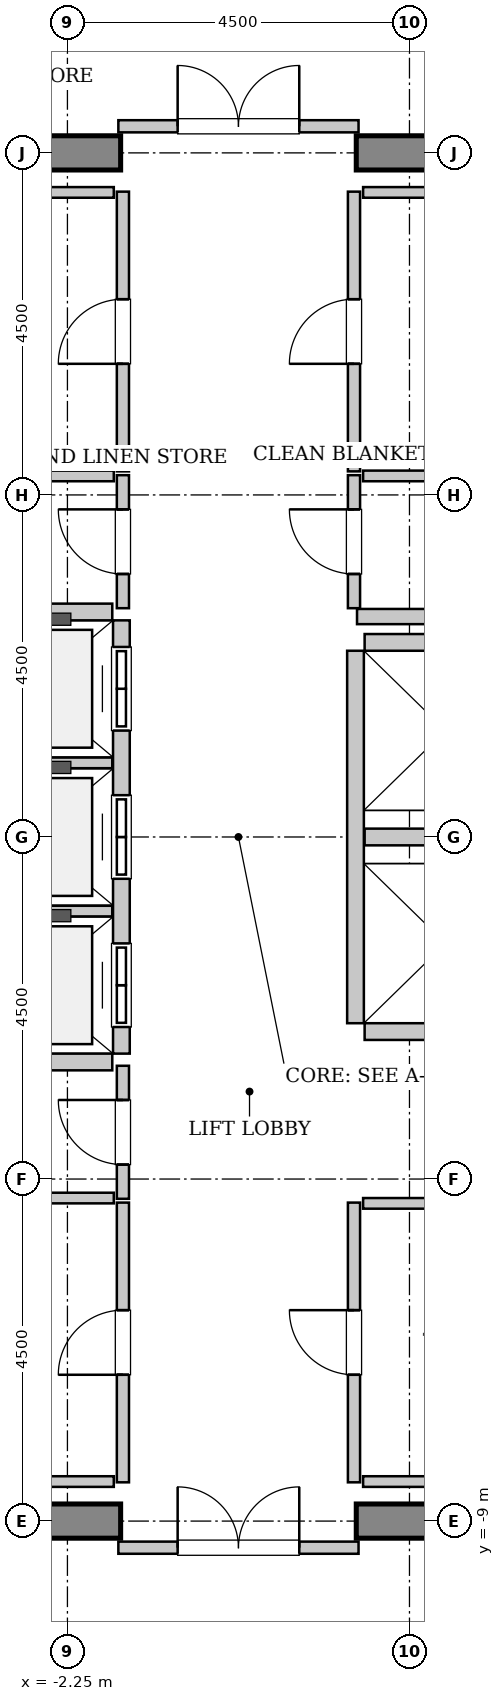
"""IFC4 building model, lengths in metres.
Left out: names, types, materials, properties, quantities, classifications, styles, units other than length and angle.
Written with IfcOpenShell. Run it as: python <this file> out.ifc"""

import sys

from ifc_helpers import new_model, si_unit, direction, frame, frame_2d, origin, place, context, subcontext, project, spatial, rectangle, extrude, source, transform, mapped, element, fill, save


model = new_model("IFC4")
c1 = context("Model", 3, precision=1e-05, world=origin(), true_north=direction((0.0, 1.0)))
c2 = subcontext(c1, "Body", "Model", "MODEL_VIEW")
j1 = project(units=[si_unit("LENGTHUNIT", "METRE"), si_unit("PLANEANGLEUNIT", "RADIAN")], contexts=[c1])
p1 = place(None, origin())
s1 = spatial("IfcSite", under=j1, at=p1, CompositionType="ELEMENT")
p2 = place(p1, origin())
s2 = spatial("IfcBuilding", under=s1, at=p2, CompositionType="ELEMENT")
p3 = place(p2, frame((0.0, 0.0, 314.0)))
s3 = spatial("IfcBuildingStorey", under=s2, at=p3, CompositionType="ELEMENT", Elevation=314.0)
m1 = source(origin(), c2, "Body", "SweptSolid", [
    extrude(rectangle(XDim=9.925, YDim=0.45, at=frame_2d((4.962, 0.0))), origin(), (0.0, 0.0, 1.0), 3.8),
])
for number, where, z_axis, x_axis in (
    (1, (-11.475, 9.0, 0.0), (0.0, 0.0, 1.0), (1.0, 0.0, 0.0)),
    (2, (1.55, 9.0, 0.0), (0.0, 0.0, 1.0), (1.0, 0.0, 0.0)),
    (3, (-11.475, -9.0, 0.0), (0.0, 0.0, 1.0), (1.0, 0.0, 0.0)),
    (4, (1.55, -9.0, 0.0), (0.0, 0.0, 1.0), (1.0, 0.0, 0.0)),
):
    element("IfcWall", number, at=place(p3, frame(where, z_axis=z_axis, x_axis=x_axis)), inside=s3, PredefinedType="SHEAR", context=c2, shape_type="MappedRepresentation", body=[
        mapped(m1, transform((0.0, 0.0, 0.0), x_axis=(1.0, 0.0, 0.0), y_axis=(0.0, 1.0, 0.0), z_axis=(0.0, 0.0, 1.0), scale=1.0)),
    ])
m2 = source(origin(), c2, "Body", "SweptSolid", [
    extrude(rectangle(XDim=5.7, YDim=0.22, at=frame_2d((2.85, 0.0))), origin(), (0.0, 0.0, 1.0), 3.485),
])
p4 = place(p3, frame((-1.54, -2.85, 0.0), z_axis=(0.0, 0.0, 1.0), x_axis=(0.0, 1.0, 0.0)))
e5 = element("IfcWall", 5, at=p4, inside=s3, PredefinedType="SOLIDWALL", context=c2, shape_type="MappedRepresentation", body=[
    mapped(m2, transform((0.0, 0.0, 0.0), x_axis=(1.0, 0.0, 0.0), y_axis=(0.0, 1.0, 0.0), z_axis=(0.0, 0.0, 1.0), scale=1.0)),
])
p5 = place(p4, frame((0.35, 0.0, 0.0)))
e6 = element("IfcOpeningElement", 6, at=p5, cuts=e5, PredefinedType="OPENING", context=c2, shape_type="SweptSolid", body=[
    extrude(rectangle(XDim=1.1, YDim=2.2, at=frame_2d((0.55, 1.1))), frame((0.0, 0.12, 0.0), z_axis=(0.0, -1.0, 0.0), x_axis=(1.0, 0.0, 0.0)), (0.0, 0.0, 1.0), 0.24),
])
p6 = place(p4, frame((2.3, 0.0, 0.0)))
e7 = element("IfcOpeningElement", 7, at=p6, cuts=e5, PredefinedType="OPENING", context=c2, shape_type="SweptSolid", body=[
    extrude(rectangle(XDim=1.1, YDim=2.2, at=frame_2d((0.55, 1.1))), frame((0.0, 0.12, 0.0), z_axis=(0.0, -1.0, 0.0), x_axis=(1.0, 0.0, 0.0)), (0.0, 0.0, 1.0), 0.24),
])
p7 = place(p4, frame((4.25, 0.0, 0.0)))
e8 = element("IfcOpeningElement", 8, at=p7, cuts=e5, PredefinedType="OPENING", context=c2, shape_type="SweptSolid", body=[
    extrude(rectangle(XDim=1.1, YDim=2.2, at=frame_2d((0.55, 1.1))), frame((0.0, 0.12, 0.0), z_axis=(0.0, -1.0, 0.0), x_axis=(1.0, 0.0, 0.0)), (0.0, 0.0, 1.0), 0.24),
])
m3 = source(origin(), c2, "Body", "SweptSolid", [
    extrude(rectangle(XDim=2.13, YDim=0.22, at=frame_2d((1.065, 0.0))), origin(), (0.0, 0.0, 1.0), 3.485),
])
p8 = place(p3, frame((-3.79, -2.96, 0.0), z_axis=(0.0, 0.0, 1.0), x_axis=(1.0, 0.0, 0.0)))
e9 = element("IfcWall", 9, at=p8, inside=s3, PredefinedType="SOLIDWALL", context=c2, shape_type="MappedRepresentation", body=[
    mapped(m3, transform((0.0, 0.0, 0.0), x_axis=(1.0, 0.0, 0.0), y_axis=(0.0, 1.0, 0.0), z_axis=(0.0, 0.0, 1.0), scale=1.0)),
])
m4 = source(origin(), c2, "Body", "SweptSolid", [
    extrude(rectangle(XDim=2.13, YDim=0.14, at=frame_2d((1.065, 0.0))), origin(), (0.0, 0.0, 1.0), 3.485),
])
for number, where, z_axis, x_axis in (
    (10, (-3.79, -0.975, 0.0), (0.0, 0.0, 1.0), (1.0, 0.0, 0.0)),
    (11, (-3.79, 0.975, 0.0), (0.0, 0.0, 1.0), (1.0, 0.0, 0.0)),
):
    element("IfcWall", number, at=place(p3, frame(where, z_axis=z_axis, x_axis=x_axis)), inside=s3, PredefinedType="PARTITIONING", context=c2, shape_type="MappedRepresentation", body=[
        mapped(m4, transform((0.0, 0.0, 0.0), x_axis=(1.0, 0.0, 0.0), y_axis=(0.0, 1.0, 0.0), z_axis=(0.0, 0.0, 1.0), scale=1.0)),
    ])
p9 = place(p3, frame((-1.66, 2.96, 0.0), z_axis=(0.0, 0.0, 1.0), x_axis=(-1.0, 0.0, 0.0)))
e12 = element("IfcWall", 12, at=p9, inside=s3, PredefinedType="SOLIDWALL", context=c2, shape_type="MappedRepresentation", body=[
    mapped(m3, transform((0.0, 0.0, 0.0), x_axis=(1.0, 0.0, 0.0), y_axis=(0.0, 1.0, 0.0), z_axis=(0.0, 0.0, 1.0), scale=1.0)),
])
m5 = source(origin(), c2, "Body", "SweptSolid", [
    extrude(rectangle(XDim=4.9, YDim=0.22, at=frame_2d((2.45, 0.0))), origin(), (0.0, 0.0, 1.0), 3.485),
])
p10 = place(p3, frame((1.54, 2.45, 0.0), z_axis=(0.0, 0.0, 1.0), x_axis=(0.0, -1.0, 0.0)))
e13 = element("IfcWall", 13, at=p10, inside=s3, PredefinedType="SOLIDWALL", context=c2, shape_type="MappedRepresentation", body=[
    mapped(m5, transform((0.0, 0.0, 0.0), x_axis=(1.0, 0.0, 0.0), y_axis=(0.0, 1.0, 0.0), z_axis=(0.0, 0.0, 1.0), scale=1.0)),
])
for number, where, z_axis, x_axis in (
    (14, (1.66, -2.56, 0.0), (0.0, 0.0, 1.0), (1.0, 0.0, 0.0)),
    (15, (1.66, 0.0, 0.0), (0.0, 0.0, 1.0), (1.0, 0.0, 0.0)),
    (16, (3.79, 2.56, 0.0), (0.0, 0.0, 1.0), (-1.0, 0.0, 0.0)),
):
    element("IfcWall", number, at=place(p3, frame(where, z_axis=z_axis, x_axis=x_axis)), inside=s3, PredefinedType="SOLIDWALL", context=c2, shape_type="MappedRepresentation", body=[
        mapped(m3, transform((0.0, 0.0, 0.0), x_axis=(1.0, 0.0, 0.0), y_axis=(0.0, 1.0, 0.0), z_axis=(0.0, 0.0, 1.0), scale=1.0)),
    ])
m6 = source(origin(), c2, "Body", "SweptSolid", [
    extrude(rectangle(XDim=2.52, YDim=0.2, at=frame_2d((1.26, 0.0))), origin(), (0.0, 0.0, 1.0), 3.485),
])
p11 = place(p3, frame((1.56, 2.9, 0.0), z_axis=(0.0, 0.0, 1.0), x_axis=(1.0, 0.0, 0.0)))
e17 = element("IfcWall", 17, at=p11, inside=s3, PredefinedType="PARTITIONING", context=c2, shape_type="MappedRepresentation", body=[
    mapped(m6, transform((0.0, 0.0, 0.0), x_axis=(1.0, 0.0, 0.0), y_axis=(0.0, 1.0, 0.0), z_axis=(0.0, 0.0, 1.0), scale=1.0)),
])
m7 = source(origin(), c2, "Body", "SweptSolid", [
    extrude(rectangle(XDim=3.16, YDim=0.16, at=frame_2d((1.58, 0.0))), origin(), (0.0, 0.0, 1.0), 2.575),
])
p12 = place(p3, frame((-1.58, 9.35, 0.0), z_axis=(0.0, 0.0, 1.0), x_axis=(1.0, 0.0, 0.0)))
e18 = element("IfcWall", 18, at=p12, inside=s3, PredefinedType="PARTITIONING", context=c2, shape_type="MappedRepresentation", body=[
    mapped(m7, transform((0.0, 0.0, 0.0), x_axis=(1.0, 0.0, 0.0), y_axis=(0.0, 1.0, 0.0), z_axis=(0.0, 0.0, 1.0), scale=1.0)),
])
p13 = place(p12, frame((0.78, 0.0, 0.0)))
e19 = element("IfcOpeningElement", 19, at=p13, cuts=e18, PredefinedType="OPENING", context=c2, shape_type="SweptSolid", body=[
    extrude(rectangle(XDim=1.6, YDim=2.3, at=frame_2d((0.8, 1.15))), frame((0.0, 0.09, 0.0), z_axis=(0.0, -1.0, 0.0), x_axis=(1.0, 0.0, 0.0)), (0.0, 0.0, 1.0), 0.18),
])
p14 = place(p3, frame((-1.58, -9.35, 0.0), z_axis=(0.0, 0.0, 1.0), x_axis=(1.0, 0.0, 0.0)))
e20 = element("IfcWall", 20, at=p14, inside=s3, PredefinedType="PARTITIONING", context=c2, shape_type="MappedRepresentation", body=[
    mapped(m7, transform((0.0, 0.0, 0.0), x_axis=(1.0, 0.0, 0.0), y_axis=(0.0, 1.0, 0.0), z_axis=(0.0, 0.0, 1.0), scale=1.0)),
])
p15 = place(p14, frame((0.78, 0.0, 0.0)))
e21 = element("IfcOpeningElement", 21, at=p15, cuts=e20, PredefinedType="OPENING", context=c2, shape_type="SweptSolid", body=[
    extrude(rectangle(XDim=1.6, YDim=2.3, at=frame_2d((0.8, 1.15))), frame((0.0, 0.09, 0.0), z_axis=(0.0, -1.0, 0.0), x_axis=(1.0, 0.0, 0.0)), (0.0, 0.0, 1.0), 0.18),
])
m8 = source(origin(), c2, "Body", "SweptSolid", [
    extrude(rectangle(XDim=1.75, YDim=0.16, at=frame_2d((0.875, 0.0))), origin(), (0.0, 0.0, 1.0), 3.485),
])
p16 = place(p3, frame((-1.52, 3.01, 0.0), z_axis=(0.0, 0.0, 1.0), x_axis=(0.0, 1.0, 0.0)))
e22 = element("IfcWall", 22, at=p16, inside=s3, PredefinedType="PARTITIONING", context=c2, shape_type="MappedRepresentation", body=[
    mapped(m8, transform((0.0, 0.0, 0.0), x_axis=(1.0, 0.0, 0.0), y_axis=(0.0, 1.0, 0.0), z_axis=(0.0, 0.0, 1.0), scale=1.0)),
])
p17 = place(p16, frame((0.45, 0.0, 0.0)))
e23 = element("IfcOpeningElement", 23, at=p17, cuts=e22, PredefinedType="OPENING", context=c2, shape_type="SweptSolid", body=[
    extrude(rectangle(XDim=0.85, YDim=2.1, at=frame_2d((0.425, 1.05))), frame((0.0, 0.09, 0.0), z_axis=(0.0, -1.0, 0.0), x_axis=(1.0, 0.0, 0.0)), (0.0, 0.0, 1.0), 0.18),
])
m9 = source(origin(), c2, "Body", "SweptSolid", [
    extrude(rectangle(XDim=2.95, YDim=0.14, at=frame_2d((1.475, 0.0))), origin(), (0.0, 0.0, 1.0), 3.485),
])
p18 = place(p3, frame((-4.59, 4.75, 0.0), z_axis=(0.0, 0.0, 1.0), x_axis=(1.0, 0.0, 0.0)))
e24 = element("IfcWall", 24, at=p18, inside=s3, PredefinedType="PARTITIONING", context=c2, shape_type="MappedRepresentation", body=[
    mapped(m9, transform((0.0, 0.0, 0.0), x_axis=(1.0, 0.0, 0.0), y_axis=(0.0, 1.0, 0.0), z_axis=(0.0, 0.0, 1.0), scale=1.0)),
])
m10 = source(origin(), c2, "Body", "SweptSolid", [
    extrude(rectangle(XDim=3.68, YDim=0.16, at=frame_2d((1.84, 0.0))), origin(), (0.0, 0.0, 1.0), 3.485),
])
p19 = place(p3, frame((-1.52, 4.81, 0.0), z_axis=(0.0, 0.0, 1.0), x_axis=(0.0, 1.0, 0.0)))
e25 = element("IfcWall", 25, at=p19, inside=s3, PredefinedType="PARTITIONING", context=c2, shape_type="MappedRepresentation", body=[
    mapped(m10, transform((0.0, 0.0, 0.0), x_axis=(1.0, 0.0, 0.0), y_axis=(0.0, 1.0, 0.0), z_axis=(0.0, 0.0, 1.0), scale=1.0)),
])
p20 = place(p19, frame((1.415, 0.0, 0.0)))
e26 = element("IfcOpeningElement", 26, at=p20, cuts=e25, PredefinedType="OPENING", context=c2, shape_type="SweptSolid", body=[
    extrude(rectangle(XDim=0.85, YDim=2.1, at=frame_2d((0.425, 1.05))), frame((0.0, 0.09, 0.0), z_axis=(0.0, -1.0, 0.0), x_axis=(1.0, 0.0, 0.0)), (0.0, 0.0, 1.0), 0.18),
])
m11 = source(origin(), c2, "Body", "SweptSolid", [
    extrude(rectangle(XDim=3.15, YDim=0.14, at=frame_2d((1.575, 0.0))), origin(), (0.0, 0.0, 1.0), 3.485),
])
p21 = place(p3, frame((-4.79, 8.48, 0.0), z_axis=(0.0, 0.0, 1.0), x_axis=(1.0, 0.0, 0.0)))
e27 = element("IfcWall", 27, at=p21, inside=s3, PredefinedType="PARTITIONING", context=c2, shape_type="MappedRepresentation", body=[
    mapped(m11, transform((0.0, 0.0, 0.0), x_axis=(1.0, 0.0, 0.0), y_axis=(0.0, 1.0, 0.0), z_axis=(0.0, 0.0, 1.0), scale=1.0)),
])
p22 = place(p3, frame((1.52, 3.01, 0.0), z_axis=(0.0, 0.0, 1.0), x_axis=(0.0, 1.0, 0.0)))
e28 = element("IfcWall", 28, at=p22, inside=s3, PredefinedType="PARTITIONING", context=c2, shape_type="MappedRepresentation", body=[
    mapped(m8, transform((0.0, 0.0, 0.0), x_axis=(1.0, 0.0, 0.0), y_axis=(0.0, 1.0, 0.0), z_axis=(0.0, 0.0, 1.0), scale=1.0)),
])
p23 = place(p22, frame((0.45, 0.0, 0.0)))
e29 = element("IfcOpeningElement", 29, at=p23, cuts=e28, PredefinedType="OPENING", context=c2, shape_type="SweptSolid", body=[
    extrude(rectangle(XDim=0.85, YDim=2.1, at=frame_2d((0.425, 1.05))), frame((0.0, 0.09, 0.0), z_axis=(0.0, -1.0, 0.0), x_axis=(1.0, 0.0, 0.0)), (0.0, 0.0, 1.0), 0.18),
])
p24 = place(p3, frame((1.64, 4.75, 0.0), z_axis=(0.0, 0.0, 1.0), x_axis=(1.0, 0.0, 0.0)))
e30 = element("IfcWall", 30, at=p24, inside=s3, PredefinedType="PARTITIONING", context=c2, shape_type="MappedRepresentation", body=[
    mapped(m11, transform((0.0, 0.0, 0.0), x_axis=(1.0, 0.0, 0.0), y_axis=(0.0, 1.0, 0.0), z_axis=(0.0, 0.0, 1.0), scale=1.0)),
])
p25 = place(p3, frame((1.52, 4.81, 0.0), z_axis=(0.0, 0.0, 1.0), x_axis=(0.0, 1.0, 0.0)))
e31 = element("IfcWall", 31, at=p25, inside=s3, PredefinedType="PARTITIONING", context=c2, shape_type="MappedRepresentation", body=[
    mapped(m10, transform((0.0, 0.0, 0.0), x_axis=(1.0, 0.0, 0.0), y_axis=(0.0, 1.0, 0.0), z_axis=(0.0, 0.0, 1.0), scale=1.0)),
])
p26 = place(p25, frame((1.415, 0.0, 0.0)))
e32 = element("IfcOpeningElement", 32, at=p26, cuts=e31, PredefinedType="OPENING", context=c2, shape_type="SweptSolid", body=[
    extrude(rectangle(XDim=0.85, YDim=2.1, at=frame_2d((0.425, 1.05))), frame((0.0, 0.09, 0.0), z_axis=(0.0, -1.0, 0.0), x_axis=(1.0, 0.0, 0.0)), (0.0, 0.0, 1.0), 0.18),
])
p27 = place(p3, frame((1.64, 8.48, 0.0), z_axis=(0.0, 0.0, 1.0), x_axis=(1.0, 0.0, 0.0)))
e33 = element("IfcWall", 33, at=p27, inside=s3, PredefinedType="PARTITIONING", context=c2, shape_type="MappedRepresentation", body=[
    mapped(m11, transform((0.0, 0.0, 0.0), x_axis=(1.0, 0.0, 0.0), y_axis=(0.0, 1.0, 0.0), z_axis=(0.0, 0.0, 1.0), scale=1.0)),
])
p28 = place(p3, frame((-1.52, -4.76, 0.0), z_axis=(0.0, 0.0, 1.0), x_axis=(0.0, 1.0, 0.0)))
e34 = element("IfcWall", 34, at=p28, inside=s3, PredefinedType="PARTITIONING", context=c2, shape_type="MappedRepresentation", body=[
    mapped(m8, transform((0.0, 0.0, 0.0), x_axis=(1.0, 0.0, 0.0), y_axis=(0.0, 1.0, 0.0), z_axis=(0.0, 0.0, 1.0), scale=1.0)),
])
p29 = place(p28, frame((0.45, 0.0, 0.0)))
e35 = element("IfcOpeningElement", 35, at=p29, cuts=e34, PredefinedType="OPENING", context=c2, shape_type="SweptSolid", body=[
    extrude(rectangle(XDim=0.85, YDim=2.1, at=frame_2d((0.425, 1.05))), frame((0.0, 0.09, 0.0), z_axis=(0.0, -1.0, 0.0), x_axis=(1.0, 0.0, 0.0)), (0.0, 0.0, 1.0), 0.18),
])
p30 = place(p3, frame((-4.79, -4.75, 0.0), z_axis=(0.0, 0.0, 1.0), x_axis=(1.0, 0.0, 0.0)))
e36 = element("IfcWall", 36, at=p30, inside=s3, PredefinedType="PARTITIONING", context=c2, shape_type="MappedRepresentation", body=[
    mapped(m11, transform((0.0, 0.0, 0.0), x_axis=(1.0, 0.0, 0.0), y_axis=(0.0, 1.0, 0.0), z_axis=(0.0, 0.0, 1.0), scale=1.0)),
])
p31 = place(p3, frame((-1.52, -8.49, 0.0), z_axis=(0.0, 0.0, 1.0), x_axis=(0.0, 1.0, 0.0)))
e37 = element("IfcWall", 37, at=p31, inside=s3, PredefinedType="PARTITIONING", context=c2, shape_type="MappedRepresentation", body=[
    mapped(m10, transform((0.0, 0.0, 0.0), x_axis=(1.0, 0.0, 0.0), y_axis=(0.0, 1.0, 0.0), z_axis=(0.0, 0.0, 1.0), scale=1.0)),
])
p32 = place(p31, frame((1.415, 0.0, 0.0)))
e38 = element("IfcOpeningElement", 38, at=p32, cuts=e37, PredefinedType="OPENING", context=c2, shape_type="SweptSolid", body=[
    extrude(rectangle(XDim=0.85, YDim=2.1, at=frame_2d((0.425, 1.05))), frame((0.0, 0.09, 0.0), z_axis=(0.0, -1.0, 0.0), x_axis=(1.0, 0.0, 0.0)), (0.0, 0.0, 1.0), 0.18),
])
m12 = source(origin(), c2, "Body", "SweptSolid", [
    extrude(rectangle(XDim=3.03, YDim=0.14, at=frame_2d((1.515, 0.0))), origin(), (0.0, 0.0, 1.0), 3.485),
])
p33 = place(p3, frame((-4.67, -8.48, 0.0), z_axis=(0.0, 0.0, 1.0), x_axis=(1.0, 0.0, 0.0)))
e39 = element("IfcWall", 39, at=p33, inside=s3, PredefinedType="PARTITIONING", context=c2, shape_type="MappedRepresentation", body=[
    mapped(m12, transform((0.0, 0.0, 0.0), x_axis=(1.0, 0.0, 0.0), y_axis=(0.0, 1.0, 0.0), z_axis=(0.0, 0.0, 1.0), scale=1.0)),
])
p34 = place(p3, frame((1.52, -8.49, 0.0), z_axis=(0.0, 0.0, 1.0), x_axis=(0.0, 1.0, 0.0)))
e40 = element("IfcWall", 40, at=p34, inside=s3, PredefinedType="PARTITIONING", context=c2, shape_type="MappedRepresentation", body=[
    mapped(m10, transform((0.0, 0.0, 0.0), x_axis=(1.0, 0.0, 0.0), y_axis=(0.0, 1.0, 0.0), z_axis=(0.0, 0.0, 1.0), scale=1.0)),
])
p35 = place(p34, frame((1.415, 0.0, 0.0)))
e41 = element("IfcOpeningElement", 41, at=p35, cuts=e40, PredefinedType="OPENING", context=c2, shape_type="SweptSolid", body=[
    extrude(rectangle(XDim=0.85, YDim=2.1, at=frame_2d((0.425, 1.05))), frame((0.0, 0.09, 0.0), z_axis=(0.0, -1.0, 0.0), x_axis=(1.0, 0.0, 0.0)), (0.0, 0.0, 1.0), 0.18),
])
p36 = place(p3, frame((1.64, -4.82, 0.0), z_axis=(0.0, 0.0, 1.0), x_axis=(1.0, 0.0, 0.0)))
e42 = element("IfcWall", 42, at=p36, inside=s3, PredefinedType="PARTITIONING", context=c2, shape_type="MappedRepresentation", body=[
    mapped(m9, transform((0.0, 0.0, 0.0), x_axis=(1.0, 0.0, 0.0), y_axis=(0.0, 1.0, 0.0), z_axis=(0.0, 0.0, 1.0), scale=1.0)),
])
p37 = place(p3, frame((1.64, -8.48, 0.0), z_axis=(0.0, 0.0, 1.0), x_axis=(1.0, 0.0, 0.0)))
e43 = element("IfcWall", 43, at=p37, inside=s3, PredefinedType="PARTITIONING", context=c2, shape_type="MappedRepresentation", body=[
    mapped(m11, transform((0.0, 0.0, 0.0), x_axis=(1.0, 0.0, 0.0), y_axis=(0.0, 1.0, 0.0), z_axis=(0.0, 0.0, 1.0), scale=1.0)),
])
m13 = source(origin(), c2, "Body", "SweptSolid", [
    extrude(rectangle(XDim=1.1, YDim=2.2, at=frame_2d((0.55, 1.1))), frame((0.0, 0.025, 0.0), z_axis=(0.0, -1.0, 0.0), x_axis=(1.0, 0.0, 0.0)), (0.0, 0.0, 1.0), 0.05),
])
p38 = place(p5, origin())
e44 = element("IfcDoor", 44, at=p38, inside=s3, OperationType="DOUBLE_DOOR_SLIDING", PredefinedType="DOOR", context=c2, shape_type="MappedRepresentation", body=[
    mapped(m13, transform((0.0, 0.0, 0.0), x_axis=(1.0, 0.0, 0.0), y_axis=(0.0, 1.0, 0.0), z_axis=(0.0, 0.0, 1.0), scale=1.0)),
])
fill(e6, e44)
p39 = place(p6, origin())
e45 = element("IfcDoor", 45, at=p39, inside=s3, OperationType="DOUBLE_DOOR_SLIDING", PredefinedType="DOOR", context=c2, shape_type="MappedRepresentation", body=[
    mapped(m13, transform((0.0, 0.0, 0.0), x_axis=(1.0, 0.0, 0.0), y_axis=(0.0, 1.0, 0.0), z_axis=(0.0, 0.0, 1.0), scale=1.0)),
])
fill(e7, e45)
p40 = place(p7, origin())
e46 = element("IfcDoor", 46, at=p40, inside=s3, OperationType="DOUBLE_DOOR_SLIDING", PredefinedType="DOOR", context=c2, shape_type="MappedRepresentation", body=[
    mapped(m13, transform((0.0, 0.0, 0.0), x_axis=(1.0, 0.0, 0.0), y_axis=(0.0, 1.0, 0.0), z_axis=(0.0, 0.0, 1.0), scale=1.0)),
])
fill(e8, e46)
m14 = source(origin(), c2, "Body", "SweptSolid", [
    extrude(rectangle(XDim=1.6, YDim=2.3, at=frame_2d((0.8, 1.15))), frame((0.0, 0.025, 0.0), z_axis=(0.0, -1.0, 0.0), x_axis=(1.0, 0.0, 0.0)), (0.0, 0.0, 1.0), 0.05),
])
p41 = place(p13, origin())
e47 = element("IfcDoor", 47, at=p41, inside=s3, OperationType="DOUBLE_DOOR_SINGLE_SWING", PredefinedType="DOOR", context=c2, shape_type="MappedRepresentation", body=[
    mapped(m14, transform((0.0, 0.0, 0.0), x_axis=(1.0, 0.0, 0.0), y_axis=(0.0, 1.0, 0.0), z_axis=(0.0, 0.0, 1.0), scale=1.0)),
])
fill(e19, e47)
p42 = place(p15, origin())
e48 = element("IfcDoor", 48, at=p42, inside=s3, OperationType="DOUBLE_DOOR_SINGLE_SWING", PredefinedType="DOOR", context=c2, shape_type="MappedRepresentation", body=[
    mapped(m14, transform((0.0, 0.0, 0.0), x_axis=(1.0, 0.0, 0.0), y_axis=(0.0, 1.0, 0.0), z_axis=(0.0, 0.0, 1.0), scale=1.0)),
])
fill(e21, e48)
m15 = source(origin(), c2, "Body", "SweptSolid", [
    extrude(rectangle(XDim=0.85, YDim=2.1, at=frame_2d((0.425, 1.05))), frame((0.0, 0.025, 0.0), z_axis=(0.0, -1.0, 0.0), x_axis=(1.0, 0.0, 0.0)), (0.0, 0.0, 1.0), 0.05),
])
p43 = place(p17, origin())
e49 = element("IfcDoor", 49, at=p43, inside=s3, OperationType="SINGLE_SWING_RIGHT", PredefinedType="DOOR", context=c2, shape_type="MappedRepresentation", body=[
    mapped(m15, transform((0.0, 0.0, 0.0), x_axis=(1.0, 0.0, 0.0), y_axis=(0.0, 1.0, 0.0), z_axis=(0.0, 0.0, 1.0), scale=1.0)),
])
fill(e23, e49)
p44 = place(p20, origin())
e50 = element("IfcDoor", 50, at=p44, inside=s3, OperationType="SINGLE_SWING_LEFT", PredefinedType="DOOR", context=c2, shape_type="MappedRepresentation", body=[
    mapped(m15, transform((0.0, 0.0, 0.0), x_axis=(1.0, 0.0, 0.0), y_axis=(0.0, 1.0, 0.0), z_axis=(0.0, 0.0, 1.0), scale=1.0)),
])
fill(e26, e50)
p45 = place(p23, origin())
e51 = element("IfcDoor", 51, at=p45, inside=s3, OperationType="SINGLE_SWING_RIGHT", PredefinedType="DOOR", context=c2, shape_type="MappedRepresentation", body=[
    mapped(m15, transform((0.0, 0.0, 0.0), x_axis=(1.0, 0.0, 0.0), y_axis=(0.0, 1.0, 0.0), z_axis=(0.0, 0.0, 1.0), scale=1.0)),
])
fill(e29, e51)
p46 = place(p26, origin())
e52 = element("IfcDoor", 52, at=p46, inside=s3, OperationType="SINGLE_SWING_LEFT", PredefinedType="DOOR", context=c2, shape_type="MappedRepresentation", body=[
    mapped(m15, transform((0.0, 0.0, 0.0), x_axis=(1.0, 0.0, 0.0), y_axis=(0.0, 1.0, 0.0), z_axis=(0.0, 0.0, 1.0), scale=1.0)),
])
fill(e32, e52)
p47 = place(p29, origin())
e53 = element("IfcDoor", 53, at=p47, inside=s3, OperationType="SINGLE_SWING_RIGHT", PredefinedType="DOOR", context=c2, shape_type="MappedRepresentation", body=[
    mapped(m15, transform((0.0, 0.0, 0.0), x_axis=(1.0, 0.0, 0.0), y_axis=(0.0, 1.0, 0.0), z_axis=(0.0, 0.0, 1.0), scale=1.0)),
])
fill(e35, e53)
p48 = place(p32, origin())
e54 = element("IfcDoor", 54, at=p48, inside=s3, OperationType="SINGLE_SWING_LEFT", PredefinedType="DOOR", context=c2, shape_type="MappedRepresentation", body=[
    mapped(m15, transform((0.0, 0.0, 0.0), x_axis=(1.0, 0.0, 0.0), y_axis=(0.0, 1.0, 0.0), z_axis=(0.0, 0.0, 1.0), scale=1.0)),
])
fill(e38, e54)
p49 = place(p35, origin())
e55 = element("IfcDoor", 55, at=p49, inside=s3, OperationType="SINGLE_SWING_RIGHT", PredefinedType="DOOR", context=c2, shape_type="MappedRepresentation", body=[
    mapped(m15, transform((0.0, 0.0, 0.0), x_axis=(1.0, 0.0, 0.0), y_axis=(0.0, 1.0, 0.0), z_axis=(0.0, 0.0, 1.0), scale=1.0)),
])
fill(e41, e55)
save(model, sys.argv[1])
